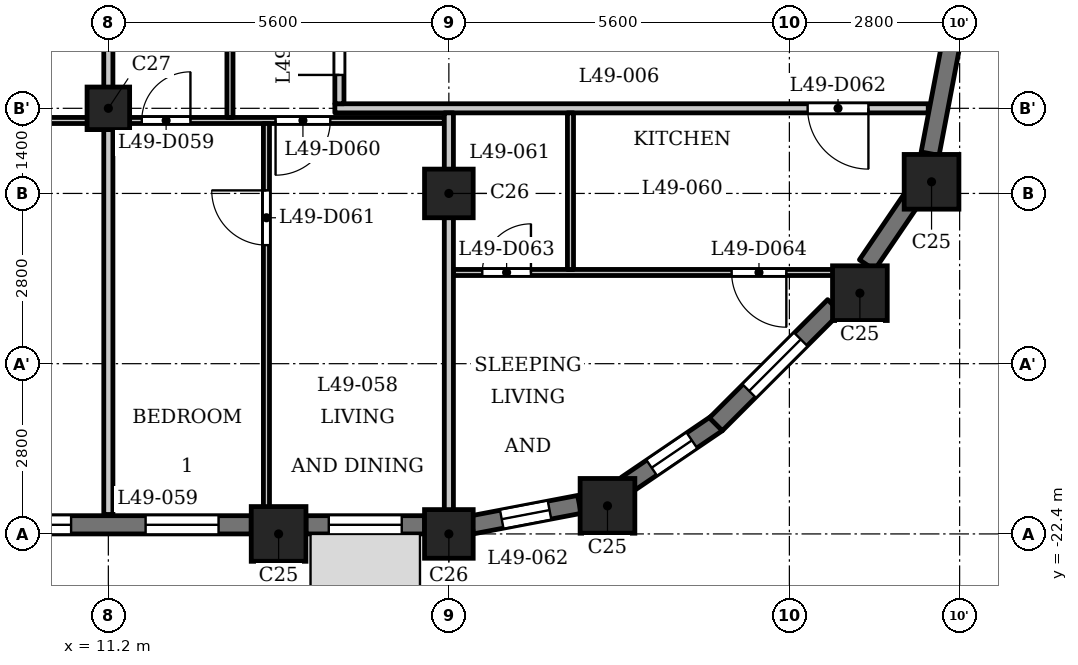
"""IFC4 building model, lengths in metres.
Left out: names, types, materials, properties, quantities, classifications, styles, units other than length and angle.
Written with IfcOpenShell. Run it as: python <this file> out.ifc"""

import sys

from ifc_helpers import new_model, si_unit, direction, frame, frame_2d, origin, origin_2d, place, context, subcontext, project, spatial, rectangle, extrude, element, fill, save


model = new_model("IFC4")
c1 = context("Model", 3, precision=1e-05, world=origin(), true_north=direction((0.0, 1.0)))
c2 = subcontext(c1, "Body", "Model", "MODEL_VIEW")
j1 = project(units=[si_unit("LENGTHUNIT", "METRE"), si_unit("PLANEANGLEUNIT", "RADIAN")], contexts=[c1])
p1 = place(None, origin())
s1 = spatial("IfcSite", under=j1, at=p1, CompositionType="ELEMENT")
p2 = place(p1, origin())
s2 = spatial("IfcBuilding", under=s1, at=p2, CompositionType="ELEMENT")
p3 = place(p2, frame((0.0, 0.0, 192.4)))
s3 = spatial("IfcBuildingStorey", under=s2, at=p3, CompositionType="ELEMENT", Elevation=192.4)
for number, where, z_axis, x_axis in (
    (1, (14.0, -22.4, 0.0), (0.0, 0.0, 1.0), (1.0, 0.0, 0.0)),
    (2, (19.409, -21.938, 0.0), (0.0, 0.0, 1.0), (1.0, 0.0, 0.0)),
    (3, (23.56, -18.44, 0.0), (0.0, 0.0, 1.0), (1.0, 0.0, 0.0)),
    (4, (24.738, -16.609, 0.0), (0.0, 0.0, 1.0), (1.0, 0.0, 0.0)),
):
    element("IfcColumn", number, at=place(p3, frame(where, z_axis=z_axis, x_axis=x_axis)), inside=s3, PredefinedType="COLUMN", context=c2, shape_type="SweptSolid", body=[
        extrude(rectangle(XDim=0.9, YDim=0.9, at=origin_2d()), origin(), (0.0, 0.0, 1.0), 3.5),
    ])
for number, where, z_axis, x_axis in (
    (5, (16.8, -22.4, 0.0), (0.0, 0.0, 1.0), (1.0, 0.0, 0.0)),
    (6, (16.8, -16.8, 0.0), (0.0, 0.0, 1.0), (1.0, 0.0, 0.0)),
):
    element("IfcColumn", number, at=place(p3, frame(where, z_axis=z_axis, x_axis=x_axis)), inside=s3, PredefinedType="COLUMN", context=c2, shape_type="SweptSolid", body=[
        extrude(rectangle(XDim=0.8, YDim=0.8, at=origin_2d()), origin(), (0.0, 0.0, 1.0), 3.5),
    ])
p4 = place(p3, frame((11.2, -15.4, 0.0), z_axis=(0.0, 0.0, 1.0), x_axis=(1.0, 0.0, 0.0)))
e7 = element("IfcColumn", 7, at=p4, inside=s3, PredefinedType="COLUMN", context=c2, shape_type="SweptSolid", body=[
    extrude(rectangle(XDim=0.7, YDim=0.7, at=origin_2d()), origin(), (0.0, 0.0, 1.0), 3.5),
])
p5 = place(p3, frame((8.85, -22.25, 0.0), z_axis=(0.0, 0.0, 1.0), x_axis=(1.0, 0.0, 0.0)))
e8 = element("IfcWall", 8, at=p5, inside=s3, PredefinedType="SOLIDWALL", context=c2, shape_type="SweptSolid", body=[
    extrude(rectangle(XDim=4.7, YDim=0.3, at=frame_2d((2.35, 0.0))), origin(), (0.0, 0.0, 1.0), 2.5),
])
p6 = place(p5, frame((0.538, 0.0, 0.6)))
e9 = element("IfcOpeningElement", 9, at=p6, cuts=e8, PredefinedType="OPENING", context=c2, shape_type="SweptSolid", body=[
    extrude(rectangle(XDim=1.2, YDim=1.55, at=frame_2d((0.6, 0.775))), frame((0.0, 0.16, 0.0), z_axis=(0.0, -1.0, 0.0), x_axis=(1.0, 0.0, 0.0)), (0.0, 0.0, 1.0), 0.32),
])
p7 = place(p5, frame((2.962, 0.0, 0.6)))
e10 = element("IfcOpeningElement", 10, at=p7, cuts=e8, PredefinedType="OPENING", context=c2, shape_type="SweptSolid", body=[
    extrude(rectangle(XDim=1.2, YDim=1.55, at=frame_2d((0.6, 0.775))), frame((0.0, 0.16, 0.0), z_axis=(0.0, -1.0, 0.0), x_axis=(1.0, 0.0, 0.0)), (0.0, 0.0, 1.0), 0.32),
])
p8 = place(p3, frame((14.45, -22.25, 0.0), z_axis=(0.0, 0.0, 1.0), x_axis=(1.0, 0.0, 0.0)))
e11 = element("IfcWall", 11, at=p8, inside=s3, PredefinedType="SOLIDWALL", context=c2, shape_type="SweptSolid", body=[
    extrude(rectangle(XDim=1.95, YDim=0.3, at=frame_2d((0.975, 0.0))), origin(), (0.0, 0.0, 1.0), 2.5),
])
p9 = place(p8, frame((0.375, 0.0, 0.6)))
e12 = element("IfcOpeningElement", 12, at=p9, cuts=e11, PredefinedType="OPENING", context=c2, shape_type="SweptSolid", body=[
    extrude(rectangle(XDim=1.2, YDim=1.55, at=frame_2d((0.6, 0.775))), frame((0.0, 0.16, 0.0), z_axis=(0.0, -1.0, 0.0), x_axis=(1.0, 0.0, 0.0)), (0.0, 0.0, 1.0), 0.32),
])
p10 = place(p3, frame((17.179, -22.251, 0.0), z_axis=(0.0, 0.0, 1.0), x_axis=(0.98230529033, 0.187286722942, 0.0)))
e13 = element("IfcWall", 13, at=p10, inside=s3, PredefinedType="SOLIDWALL", context=c2, shape_type="SweptSolid", body=[
    extrude(rectangle(XDim=1.799, YDim=0.3, at=frame_2d((0.899, 0.0))), origin(), (0.0, 0.0, 1.0), 2.5),
])
p11 = place(p10, frame((0.5, 0.0, 0.6)))
e14 = element("IfcOpeningElement", 14, at=p11, cuts=e13, PredefinedType="OPENING", context=c2, shape_type="SweptSolid", body=[
    extrude(rectangle(XDim=0.8, YDim=1.55, at=frame_2d((0.4, 0.775))), frame((0.0, 0.16, 0.0), z_axis=(0.0, -1.0, 0.0), x_axis=(1.0, 0.0, 0.0)), (0.0, 0.0, 1.0), 0.32),
])
p12 = place(p3, frame((19.719, -21.594, 0.0), z_axis=(0.0, 0.0, 1.0), x_axis=(0.827067282455, 0.562102935673, 0.0)))
e15 = element("IfcWall", 15, at=p12, inside=s3, PredefinedType="SOLIDWALL", context=c2, shape_type="SweptSolid", body=[
    extrude(rectangle(XDim=1.806, YDim=0.3, at=frame_2d((0.903, 0.0))), origin(), (0.0, 0.0, 1.0), 2.5),
])
p13 = place(p12, frame((0.503, 0.0, 0.6)))
e16 = element("IfcOpeningElement", 16, at=p13, cuts=e15, PredefinedType="OPENING", context=c2, shape_type="SweptSolid", body=[
    extrude(rectangle(XDim=0.8, YDim=1.55, at=frame_2d((0.4, 0.775))), frame((0.0, 0.16, 0.0), z_axis=(0.0, -1.0, 0.0), x_axis=(1.0, 0.0, 0.0)), (0.0, 0.0, 1.0), 0.32),
])
p14 = place(p3, frame((21.191, -20.597, 0.0), z_axis=(0.0, 0.0, 1.0), x_axis=(0.707106781187, 0.707106781187, 0.0)))
e17 = element("IfcWall", 17, at=p14, inside=s3, PredefinedType="SOLIDWALL", context=c2, shape_type="SweptSolid", body=[
    extrude(rectangle(XDim=2.75, YDim=0.3, at=frame_2d((1.375, 0.0))), origin(), (0.0, 0.0, 1.0), 2.5),
])
p15 = place(p14, frame((0.775, 0.0, 0.6)))
e18 = element("IfcOpeningElement", 18, at=p15, cuts=e17, PredefinedType="OPENING", context=c2, shape_type="SweptSolid", body=[
    extrude(rectangle(XDim=1.2, YDim=1.55, at=frame_2d((0.6, 0.775))), frame((0.0, 0.16, 0.0), z_axis=(0.0, -1.0, 0.0), x_axis=(1.0, 0.0, 0.0)), (0.0, 0.0, 1.0), 0.32),
])
p16 = place(p3, frame((23.676, -17.975, 0.0), z_axis=(0.0, 0.0, 1.0), x_axis=(0.56200149592, 0.827136215253, 0.0)))
e19 = element("IfcWall", 19, at=p16, inside=s3, PredefinedType="SOLIDWALL", context=c2, shape_type="SweptSolid", body=[
    extrude(rectangle(XDim=1.277, YDim=0.3, at=frame_2d((0.639, 0.0))), origin(), (0.0, 0.0, 1.0), 2.5),
])
p17 = place(p3, frame((24.714, -16.146, 0.0), z_axis=(0.0, 0.0, 1.0), x_axis=(0.187348135549, 0.982293579388, 0.0)))
e20 = element("IfcWall", 20, at=p17, inside=s3, PredefinedType="SOLIDWALL", context=c2, shape_type="SweptSolid", body=[
    extrude(rectangle(XDim=1.806, YDim=0.3, at=frame_2d((0.903, 0.0))), origin(), (0.0, 0.0, 1.0), 2.5),
])
p18 = place(p3, frame((16.875, -18.1, 0.0), z_axis=(0.0, 0.0, 1.0), x_axis=(1.0, 0.0, 0.0)))
e21 = element("IfcWall", 21, at=p18, inside=s3, PredefinedType="PARTITIONING", context=c2, shape_type="SweptSolid", body=[
    extrude(rectangle(XDim=6.765, YDim=0.1, at=frame_2d((3.382, 0.0))), origin(), (0.0, 0.0, 1.0), 3.2),
])
p19 = place(p18, frame((0.475, 0.0, 0.0)))
e22 = element("IfcOpeningElement", 22, at=p19, cuts=e21, PredefinedType="OPENING", context=c2, shape_type="SweptSolid", body=[
    extrude(rectangle(XDim=0.8, YDim=2.1, at=frame_2d((0.4, 1.05))), frame((0.0, 0.06, 0.0), z_axis=(0.0, -1.0, 0.0), x_axis=(1.0, 0.0, 0.0)), (0.0, 0.0, 1.0), 0.12),
])
p20 = place(p18, frame((4.575, 0.0, 0.0)))
e23 = element("IfcOpeningElement", 23, at=p20, cuts=e21, PredefinedType="OPENING", context=c2, shape_type="SweptSolid", body=[
    extrude(rectangle(XDim=0.9, YDim=2.1, at=frame_2d((0.45, 1.05))), frame((0.0, 0.06, 0.0), z_axis=(0.0, -1.0, 0.0), x_axis=(1.0, 0.0, 0.0)), (0.0, 0.0, 1.0), 0.12),
])
p21 = place(p3, frame((-16.725, -15.6, 0.0), z_axis=(0.0, 0.0, 1.0), x_axis=(1.0, 0.0, 0.0)))
e24 = element("IfcWall", 24, at=p21, inside=s3, PredefinedType="PARTITIONING", context=c2, shape_type="SweptSolid", body=[
    extrude(rectangle(XDim=33.45, YDim=0.1, at=frame_2d((16.725, 0.0))), origin(), (0.0, 0.0, 1.0), 3.2),
])
p22 = place(p21, frame((4.075, 0.0, 0.0)))
e25 = element("IfcOpeningElement", 25, at=p22, cuts=e24, PredefinedType="OPENING", context=c2, shape_type="SweptSolid", body=[
    extrude(rectangle(XDim=0.8, YDim=2.1, at=frame_2d((0.4, 1.05))), frame((0.0, 0.06, 0.0), z_axis=(0.0, -1.0, 0.0), x_axis=(1.0, 0.0, 0.0)), (0.0, 0.0, 1.0), 0.12),
])
p23 = place(p21, frame((1.825, 0.0, 0.0)))
e26 = element("IfcOpeningElement", 26, at=p23, cuts=e24, PredefinedType="OPENING", context=c2, shape_type="SweptSolid", body=[
    extrude(rectangle(XDim=0.9, YDim=2.1, at=frame_2d((0.45, 1.05))), frame((0.0, 0.06, 0.0), z_axis=(0.0, -1.0, 0.0), x_axis=(1.0, 0.0, 0.0)), (0.0, 0.0, 1.0), 0.12),
])
p24 = place(p21, frame((9.675, 0.0, 0.0)))
e27 = element("IfcOpeningElement", 27, at=p24, cuts=e24, PredefinedType="OPENING", context=c2, shape_type="SweptSolid", body=[
    extrude(rectangle(XDim=0.8, YDim=2.1, at=frame_2d((0.4, 1.05))), frame((0.0, 0.06, 0.0), z_axis=(0.0, -1.0, 0.0), x_axis=(1.0, 0.0, 0.0)), (0.0, 0.0, 1.0), 0.12),
])
p25 = place(p21, frame((14.025, 0.0, 0.0)))
e28 = element("IfcOpeningElement", 28, at=p25, cuts=e24, PredefinedType="OPENING", context=c2, shape_type="SweptSolid", body=[
    extrude(rectangle(XDim=0.9, YDim=2.1, at=frame_2d((0.45, 1.05))), frame((0.0, 0.06, 0.0), z_axis=(0.0, -1.0, 0.0), x_axis=(1.0, 0.0, 0.0)), (0.0, 0.0, 1.0), 0.12),
])
p26 = place(p21, frame((20.875, 0.0, 0.0)))
e29 = element("IfcOpeningElement", 29, at=p26, cuts=e24, PredefinedType="OPENING", context=c2, shape_type="SweptSolid", body=[
    extrude(rectangle(XDim=0.8, YDim=2.1, at=frame_2d((0.4, 1.05))), frame((0.0, 0.06, 0.0), z_axis=(0.0, -1.0, 0.0), x_axis=(1.0, 0.0, 0.0)), (0.0, 0.0, 1.0), 0.12),
])
p27 = place(p21, frame((25.225, 0.0, 0.0)))
e30 = element("IfcOpeningElement", 30, at=p27, cuts=e24, PredefinedType="OPENING", context=c2, shape_type="SweptSolid", body=[
    extrude(rectangle(XDim=0.9, YDim=2.1, at=frame_2d((0.45, 1.05))), frame((0.0, 0.06, 0.0), z_axis=(0.0, -1.0, 0.0), x_axis=(1.0, 0.0, 0.0)), (0.0, 0.0, 1.0), 0.12),
])
p28 = place(p21, frame((28.475, 0.0, 0.0)))
e31 = element("IfcOpeningElement", 31, at=p28, cuts=e24, PredefinedType="OPENING", context=c2, shape_type="SweptSolid", body=[
    extrude(rectangle(XDim=0.8, YDim=2.1, at=frame_2d((0.4, 1.05))), frame((0.0, 0.06, 0.0), z_axis=(0.0, -1.0, 0.0), x_axis=(1.0, 0.0, 0.0)), (0.0, 0.0, 1.0), 0.12),
])
p29 = place(p21, frame((30.675, 0.0, 0.0)))
e32 = element("IfcOpeningElement", 32, at=p29, cuts=e24, PredefinedType="OPENING", context=c2, shape_type="SweptSolid", body=[
    extrude(rectangle(XDim=0.9, YDim=2.1, at=frame_2d((0.45, 1.05))), frame((0.0, 0.06, 0.0), z_axis=(0.0, -1.0, 0.0), x_axis=(1.0, 0.0, 0.0)), (0.0, 0.0, 1.0), 0.12),
])
p30 = place(p3, frame((14.925, -15.4, 0.0), z_axis=(0.0, 0.0, 1.0), x_axis=(1.0, 0.0, 0.0)))
e33 = element("IfcWall", 33, at=p30, inside=s3, PredefinedType="PARTITIONING", context=c2, shape_type="SweptSolid", body=[
    extrude(rectangle(XDim=9.759, YDim=0.15, at=frame_2d((4.879, 0.0))), origin(), (0.0, 0.0, 1.0), 3.2),
])
p31 = place(p30, frame((7.775, 0.0, 0.0)))
e34 = element("IfcOpeningElement", 34, at=p31, cuts=e33, PredefinedType="OPENING", context=c2, shape_type="SweptSolid", body=[
    extrude(rectangle(XDim=1.0, YDim=2.1, at=frame_2d((0.5, 1.05))), frame((0.0, 0.085, 0.0), z_axis=(0.0, -1.0, 0.0), x_axis=(1.0, 0.0, 0.0)), (0.0, 0.0, 1.0), 0.17),
])
p32 = place(p3, frame((11.2, -22.08, 0.0), z_axis=(0.0, 0.0, 1.0), x_axis=(0.0, 1.0, 0.0)))
e35 = element("IfcWall", 35, at=p32, inside=s3, PredefinedType="PARTITIONING", context=c2, shape_type="SweptSolid", body=[
    extrude(rectangle(XDim=6.43, YDim=0.15, at=frame_2d((3.215, 0.0))), origin(), (0.0, 0.0, 1.0), 3.2),
])
p33 = place(p3, frame((11.2, -15.55, 0.0), z_axis=(0.0, 0.0, 1.0), x_axis=(0.0, 1.0, 0.0)))
e36 = element("IfcWall", 36, at=p33, inside=s3, PredefinedType="PARTITIONING", context=c2, shape_type="SweptSolid", body=[
    extrude(rectangle(XDim=2.275, YDim=0.15, at=frame_2d((1.138, 0.0))), origin(), (0.0, 0.0, 1.0), 3.2),
])
p34 = place(p3, frame((13.2, -15.55, 0.0), z_axis=(0.0, 0.0, 1.0), x_axis=(0.0, 1.0, 0.0)))
e37 = element("IfcWall", 37, at=p34, inside=s3, PredefinedType="PARTITIONING", context=c2, shape_type="SweptSolid", body=[
    extrude(rectangle(XDim=2.275, YDim=0.1, at=frame_2d((1.138, 0.0))), origin(), (0.0, 0.0, 1.0), 3.2),
])
p35 = place(p3, frame((13.8, -22.83, 0.0), z_axis=(0.0, 0.0, 1.0), x_axis=(0.0, 1.0, 0.0)))
e38 = element("IfcWall", 38, at=p35, inside=s3, PredefinedType="PARTITIONING", context=c2, shape_type="SweptSolid", body=[
    extrude(rectangle(XDim=7.18, YDim=0.1, at=frame_2d((3.59, 0.0))), origin(), (0.0, 0.0, 1.0), 3.2),
])
p36 = place(p35, frame((5.18, 0.0, 0.0)))
e39 = element("IfcOpeningElement", 39, at=p36, cuts=e38, PredefinedType="OPENING", context=c2, shape_type="SweptSolid", body=[
    extrude(rectangle(XDim=0.9, YDim=2.1, at=frame_2d((0.45, 1.05))), frame((0.0, 0.06, 0.0), z_axis=(0.0, -1.0, 0.0), x_axis=(1.0, 0.0, 0.0)), (0.0, 0.0, 1.0), 0.12),
])
p37 = place(p3, frame((15.0, -15.325, 0.0), z_axis=(0.0, 0.0, 1.0), x_axis=(0.0, 1.0, 0.0)))
e40 = element("IfcWall", 40, at=p37, inside=s3, PredefinedType="PARTITIONING", context=c2, shape_type="SweptSolid", body=[
    extrude(rectangle(XDim=2.05, YDim=0.15, at=frame_2d((1.025, 0.0))), origin(), (0.0, 0.0, 1.0), 3.2),
])
p38 = place(p37, frame((0.474, 0.0, 0.0)))
e41 = element("IfcOpeningElement", 41, at=p38, cuts=e40, PredefinedType="OPENING", context=c2, shape_type="SweptSolid", body=[
    extrude(rectangle(XDim=1.0, YDim=2.1, at=frame_2d((0.5, 1.05))), frame((0.0, 0.085, 0.0), z_axis=(0.0, -1.0, 0.0), x_axis=(1.0, 0.0, 0.0)), (0.0, 0.0, 1.0), 0.17),
])
p39 = place(p3, frame((16.8, -22.31, 0.0), z_axis=(0.0, 0.0, 1.0), x_axis=(0.0, 1.0, 0.0)))
e42 = element("IfcWall", 42, at=p39, inside=s3, PredefinedType="PARTITIONING", context=c2, shape_type="SweptSolid", body=[
    extrude(rectangle(XDim=6.835, YDim=0.15, at=frame_2d((3.417, 0.0))), origin(), (0.0, 0.0, 1.0), 2.55),
])
p40 = place(p3, frame((18.8, -18.05, 0.0), z_axis=(0.0, 0.0, 1.0), x_axis=(0.0, 1.0, 0.0)))
e43 = element("IfcWall", 43, at=p40, inside=s3, PredefinedType="PARTITIONING", context=c2, shape_type="SweptSolid", body=[
    extrude(rectangle(XDim=2.575, YDim=0.1, at=frame_2d((1.288, 0.0))), origin(), (0.0, 0.0, 1.0), 3.2),
])
p41 = place(p38, origin())
e44 = element("IfcDoor", 44, at=p41, inside=s3, OperationType="SINGLE_SWING_RIGHT", PredefinedType="DOOR", context=c2, shape_type="SweptSolid", body=[
    extrude(rectangle(XDim=1.0, YDim=2.1, at=frame_2d((0.5, 1.05))), frame((0.0, 0.025, 0.0), z_axis=(0.0, -1.0, 0.0), x_axis=(1.0, 0.0, 0.0)), (0.0, 0.0, 1.0), 0.05),
])
fill(e41, e44)
p42 = place(p28, origin())
e45 = element("IfcDoor", 45, at=p42, inside=s3, OperationType="SINGLE_SWING_LEFT", PredefinedType="DOOR", context=c2, shape_type="SweptSolid", body=[
    extrude(rectangle(XDim=0.8, YDim=2.1, at=frame_2d((0.4, 1.05))), frame((0.0, 0.025, 0.0), z_axis=(0.0, -1.0, 0.0), x_axis=(1.0, 0.0, 0.0)), (0.0, 0.0, 1.0), 0.05),
])
fill(e31, e45)
p43 = place(p29, origin())
e46 = element("IfcDoor", 46, at=p43, inside=s3, OperationType="SINGLE_SWING_LEFT", PredefinedType="DOOR", context=c2, shape_type="SweptSolid", body=[
    extrude(rectangle(XDim=0.9, YDim=2.1, at=frame_2d((0.45, 1.05))), frame((0.0, 0.025, 0.0), z_axis=(0.0, -1.0, 0.0), x_axis=(1.0, 0.0, 0.0)), (0.0, 0.0, 1.0), 0.05),
])
fill(e32, e46)
p44 = place(p36, origin())
e47 = element("IfcDoor", 47, at=p44, inside=s3, OperationType="SINGLE_SWING_LEFT", PredefinedType="DOOR", context=c2, shape_type="SweptSolid", body=[
    extrude(rectangle(XDim=0.9, YDim=2.1, at=frame_2d((0.45, 1.05))), frame((0.0, 0.025, 0.0), z_axis=(0.0, -1.0, 0.0), x_axis=(1.0, 0.0, 0.0)), (0.0, 0.0, 1.0), 0.05),
])
fill(e39, e47)
p45 = place(p31, origin())
e48 = element("IfcDoor", 48, at=p45, inside=s3, OperationType="SINGLE_SWING_RIGHT", PredefinedType="DOOR", context=c2, shape_type="SweptSolid", body=[
    extrude(rectangle(XDim=1.0, YDim=2.1, at=frame_2d((0.5, 1.05))), frame((0.0, 0.025, 0.0), z_axis=(0.0, -1.0, 0.0), x_axis=(1.0, 0.0, 0.0)), (0.0, 0.0, 1.0), 0.05),
])
fill(e34, e48)
p46 = place(p19, origin())
e49 = element("IfcDoor", 49, at=p46, inside=s3, OperationType="SINGLE_SWING_LEFT", PredefinedType="DOOR", context=c2, shape_type="SweptSolid", body=[
    extrude(rectangle(XDim=0.8, YDim=2.1, at=frame_2d((0.4, 1.05))), frame((0.0, 0.025, 0.0), z_axis=(0.0, -1.0, 0.0), x_axis=(1.0, 0.0, 0.0)), (0.0, 0.0, 1.0), 0.05),
])
fill(e22, e49)
p47 = place(p20, origin())
e50 = element("IfcDoor", 50, at=p47, inside=s3, OperationType="SINGLE_SWING_RIGHT", PredefinedType="DOOR", context=c2, shape_type="SweptSolid", body=[
    extrude(rectangle(XDim=0.9, YDim=2.1, at=frame_2d((0.45, 1.05))), frame((0.0, 0.025, 0.0), z_axis=(0.0, -1.0, 0.0), x_axis=(1.0, 0.0, 0.0)), (0.0, 0.0, 1.0), 0.05),
])
fill(e23, e50)
p48 = place(p6, origin())
e51 = element("IfcWindow", 51, at=p48, inside=s3, PartitioningType="SINGLE_PANEL", PredefinedType="WINDOW", context=c2, shape_type="SweptSolid", body=[
    extrude(rectangle(XDim=1.2, YDim=1.55, at=frame_2d((0.6, 0.775))), frame((0.0, 0.03, 0.0), z_axis=(0.0, -1.0, 0.0), x_axis=(1.0, 0.0, 0.0)), (0.0, 0.0, 1.0), 0.06),
])
fill(e9, e51)
p49 = place(p7, origin())
e52 = element("IfcWindow", 52, at=p49, inside=s3, PartitioningType="SINGLE_PANEL", PredefinedType="WINDOW", context=c2, shape_type="SweptSolid", body=[
    extrude(rectangle(XDim=1.2, YDim=1.55, at=frame_2d((0.6, 0.775))), frame((0.0, 0.03, 0.0), z_axis=(0.0, -1.0, 0.0), x_axis=(1.0, 0.0, 0.0)), (0.0, 0.0, 1.0), 0.06),
])
fill(e10, e52)
p50 = place(p9, origin())
e53 = element("IfcWindow", 53, at=p50, inside=s3, PartitioningType="SINGLE_PANEL", PredefinedType="WINDOW", context=c2, shape_type="SweptSolid", body=[
    extrude(rectangle(XDim=1.2, YDim=1.55, at=frame_2d((0.6, 0.775))), frame((0.0, 0.03, 0.0), z_axis=(0.0, -1.0, 0.0), x_axis=(1.0, 0.0, 0.0)), (0.0, 0.0, 1.0), 0.06),
])
fill(e12, e53)
p51 = place(p11, origin())
e54 = element("IfcWindow", 54, at=p51, inside=s3, PartitioningType="SINGLE_PANEL", PredefinedType="WINDOW", context=c2, shape_type="SweptSolid", body=[
    extrude(rectangle(XDim=0.8, YDim=1.55, at=frame_2d((0.4, 0.775))), frame((0.0, 0.03, 0.0), z_axis=(0.0, -1.0, 0.0), x_axis=(1.0, 0.0, 0.0)), (0.0, 0.0, 1.0), 0.06),
])
fill(e14, e54)
p52 = place(p13, origin())
e55 = element("IfcWindow", 55, at=p52, inside=s3, PartitioningType="SINGLE_PANEL", PredefinedType="WINDOW", context=c2, shape_type="SweptSolid", body=[
    extrude(rectangle(XDim=0.8, YDim=1.55, at=frame_2d((0.4, 0.775))), frame((0.0, 0.03, 0.0), z_axis=(0.0, -1.0, 0.0), x_axis=(1.0, 0.0, 0.0)), (0.0, 0.0, 1.0), 0.06),
])
fill(e16, e55)
p53 = place(p15, origin())
e56 = element("IfcWindow", 56, at=p53, inside=s3, PartitioningType="SINGLE_PANEL", PredefinedType="WINDOW", context=c2, shape_type="SweptSolid", body=[
    extrude(rectangle(XDim=1.2, YDim=1.55, at=frame_2d((0.6, 0.775))), frame((0.0, 0.03, 0.0), z_axis=(0.0, -1.0, 0.0), x_axis=(1.0, 0.0, 0.0)), (0.0, 0.0, 1.0), 0.06),
])
fill(e18, e56)
save(model, sys.argv[1])
